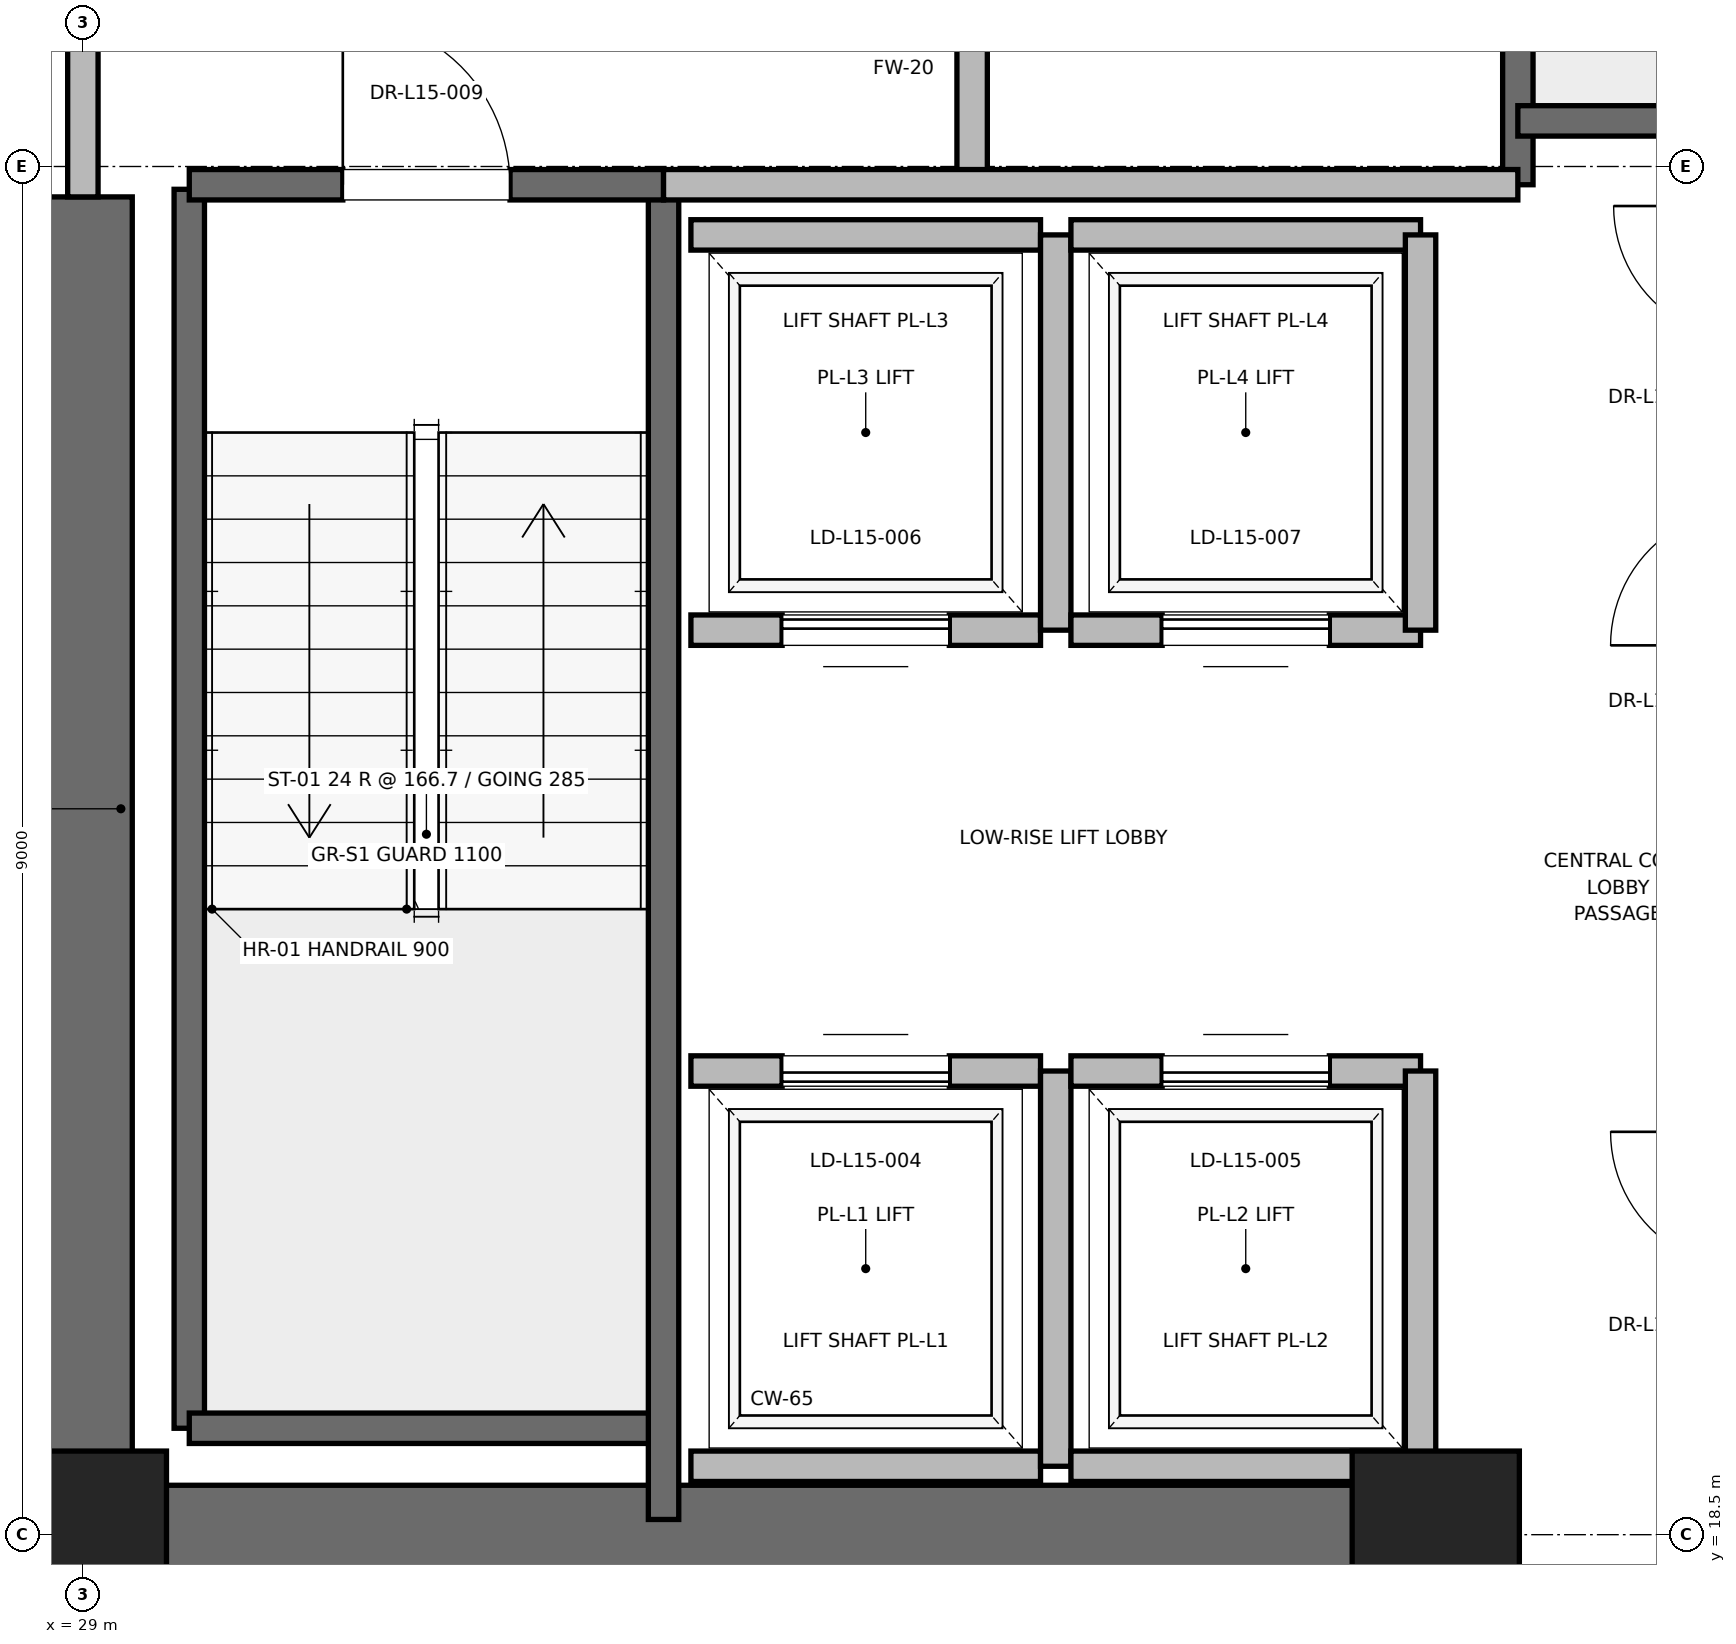
"""IFC4 building model, lengths in metres.
Left out: names, types, materials, properties, quantities, classifications, styles, units other than length and angle.
Written with IfcOpenShell. Run it as: python <this file> out.ifc"""

import sys

from ifc_helpers import new_model, si_unit, direction, frame, frame_2d, origin, origin_2d, place, context, subcontext, project, spatial, rectangle, extrude, element, fill, save


model = new_model("IFC4")
c1 = context("Model", 3, precision=1e-05, world=origin(), true_north=direction((0.0, 1.0)))
c2 = subcontext(c1, "Body", "Model", "MODEL_VIEW")
j1 = project(units=[si_unit("LENGTHUNIT", "METRE"), si_unit("PLANEANGLEUNIT", "RADIAN")], contexts=[c1])
p1 = place(None, origin())
s1 = spatial("IfcSite", under=j1, at=p1, CompositionType="ELEMENT")
p2 = place(p1, origin())
s2 = spatial("IfcBuilding", under=s1, at=p2, CompositionType="ELEMENT")
p3 = place(p2, frame((0.0, 0.0, 67.6)))
s3 = spatial("IfcBuildingStorey", under=s2, at=p3, CompositionType="ELEMENT", Elevation=67.6)
for number, where, z_axis, x_axis in (
    (1, (29.0, 18.5, 0.0), (0.0, 0.0, 1.0), (1.0, 0.0, 0.0)),
    (2, (37.9, 18.5, 0.0), (0.0, 0.0, 1.0), (1.0, 0.0, 0.0)),
):
    element("IfcColumn", number, at=place(p3, frame(where, z_axis=z_axis, x_axis=x_axis)), inside=s3, PredefinedType="PILASTER", context=c2, shape_type="SweptSolid", body=[
        extrude(rectangle(XDim=1.1, YDim=1.1, at=origin_2d()), origin(), (0.0, 0.0, 1.0), 4.0),
    ])
p4 = place(p3, frame((29.0, 18.5, 0.0), z_axis=(0.0, 0.0, 1.0), x_axis=(1.0, 0.0, 0.0)))
e3 = element("IfcWall", 3, at=p4, inside=s3, PredefinedType="SHEAR", context=c2, shape_type="SweptSolid", body=[
    extrude(rectangle(XDim=9.2, YDim=0.65, at=frame_2d((4.6, 0.0))), origin(), (0.0, 0.0, 1.0), 3.76),
])
p5 = place(p3, frame((29.0, 18.5, 0.0), z_axis=(0.0, 0.0, 1.0), x_axis=(0.0, 1.0, 0.0)))
e4 = element("IfcWall", 4, at=p5, inside=s3, PredefinedType="SHEAR", context=c2, shape_type="SweptSolid", body=[
    extrude(rectangle(XDim=8.8, YDim=0.65, at=frame_2d((4.4, 0.0))), origin(), (0.0, 0.0, 1.0), 3.76),
])
p6 = place(p3, frame((29.7, 19.2, 0.0), z_axis=(0.0, 0.0, 1.0), x_axis=(0.0, 1.0, 0.0)))
e5 = element("IfcWall", 5, at=p6, inside=s3, PredefinedType="SOLIDWALL", context=c2, shape_type="SweptSolid", body=[
    extrude(rectangle(XDim=8.15, YDim=0.2, at=frame_2d((4.075, 0.0))), origin(), (0.0, 0.0, 1.0), 3.76),
])
p7 = place(p3, frame((29.7, 19.2, 0.0), z_axis=(0.0, 0.0, 1.0), x_axis=(1.0, 0.0, 0.0)))
e6 = element("IfcWall", 6, at=p7, inside=s3, PredefinedType="SOLIDWALL", context=c2, shape_type="SweptSolid", body=[
    extrude(rectangle(XDim=3.12, YDim=0.2, at=frame_2d((1.56, 0.0))), origin(), (0.0, 0.0, 1.0), 3.76),
])
p8 = place(p3, frame((32.82, 18.6, 0.0), z_axis=(0.0, 0.0, 1.0), x_axis=(0.0, 1.0, 0.0)))
e7 = element("IfcWall", 7, at=p8, inside=s3, PredefinedType="SOLIDWALL", context=c2, shape_type="SweptSolid", body=[
    extrude(rectangle(XDim=8.78, YDim=0.2, at=frame_2d((4.39, 0.0))), origin(), (0.0, 0.0, 1.0), 3.76),
])
p9 = place(p3, frame((29.7, 27.38, 0.0), z_axis=(0.0, 0.0, 1.0), x_axis=(1.0, 0.0, 0.0)))
e8 = element("IfcWall", 8, at=p9, inside=s3, PredefinedType="SOLIDWALL", context=c2, shape_type="SweptSolid", body=[
    extrude(rectangle(XDim=3.12, YDim=0.2, at=frame_2d((1.56, 0.0))), origin(), (0.0, 0.0, 1.0), 3.76),
])
p10 = place(p9, frame((1.01, 0.0, 0.0)))
e9 = element("IfcOpeningElement", 9, at=p10, cuts=e8, PredefinedType="OPENING", context=c2, shape_type="SweptSolid", body=[
    extrude(rectangle(XDim=1.1, YDim=2.15, at=frame_2d((0.55, 1.075))), frame((0.0, 0.1, 0.0), z_axis=(0.0, -1.0, 0.0), x_axis=(1.0, 0.0, 0.0)), (0.0, 0.0, 1.0), 0.2),
])
p11 = place(p3, frame((38.44, 27.38, 0.0), z_axis=(0.0, 0.0, 1.0), x_axis=(0.0, 1.0, 0.0)))
e10 = element("IfcWall", 10, at=p11, inside=s3, PredefinedType="SOLIDWALL", context=c2, shape_type="SweptSolid", body=[
    extrude(rectangle(XDim=8.87, YDim=0.2, at=frame_2d((4.435, 0.0))), origin(), (0.0, 0.0, 1.0), 3.76),
])
p12 = place(p3, frame((38.44, 27.8, 0.0), z_axis=(0.0, 0.0, 1.0), x_axis=(1.0, 0.0, 0.0)))
e11 = element("IfcWall", 11, at=p12, inside=s3, PredefinedType="SOLIDWALL", context=c2, shape_type="SweptSolid", body=[
    extrude(rectangle(XDim=3.32, YDim=0.2, at=frame_2d((1.66, 0.0))), origin(), (0.0, 0.0, 1.0), 3.76),
])
p13 = place(p3, frame((34.85, 27.38, 0.0), z_axis=(0.0, 0.0, 1.0), x_axis=(0.0, 1.0, 0.0)))
e12 = element("IfcWall", 12, at=p13, inside=s3, PredefinedType="PARTITIONING", context=c2, shape_type="SweptSolid", body=[
    extrude(rectangle(XDim=3.37, YDim=0.2, at=frame_2d((1.685, 0.0))), origin(), (0.0, 0.0, 1.0), 3.76),
])
p14 = place(p13, frame((1.11, 0.0, 0.0)))
e13 = element("IfcOpeningElement", 13, at=p14, cuts=e12, PredefinedType="OPENING", context=c2, shape_type="SweptSolid", body=[
    extrude(rectangle(XDim=1.15, YDim=2.2, at=frame_2d((0.575, 1.1))), frame((0.0, 0.1, 0.0), z_axis=(0.0, -1.0, 0.0), x_axis=(1.0, 0.0, 0.0)), (0.0, 0.0, 1.0), 0.2),
])
p15 = place(p3, frame((29.0, 27.3, 0.0), z_axis=(0.0, 0.0, 1.0), x_axis=(0.0, 1.0, 0.0)))
e14 = element("IfcWall", 14, at=p15, inside=s3, PredefinedType="PARTITIONING", context=c2, shape_type="SweptSolid", body=[
    extrude(rectangle(XDim=3.4, YDim=0.2, at=frame_2d((1.7, 0.0))), origin(), (0.0, 0.0, 1.0), 2.54),
])
p16 = place(p15, frame((1.125, 0.0, 0.0)))
e15 = element("IfcOpeningElement", 15, at=p16, cuts=e14, PredefinedType="OPENING", context=c2, shape_type="SweptSolid", body=[
    extrude(rectangle(XDim=1.15, YDim=2.2, at=frame_2d((0.575, 1.1))), frame((0.0, 0.1, 0.0), z_axis=(0.0, -1.0, 0.0), x_axis=(1.0, 0.0, 0.0)), (0.0, 0.0, 1.0), 0.2),
])
p17 = place(p3, frame((32.82, 27.38, 0.0), z_axis=(0.0, 0.0, 1.0), x_axis=(1.0, 0.0, 0.0)))
e16 = element("IfcWall", 16, at=p17, inside=s3, PredefinedType="PARTITIONING", context=c2, shape_type="SweptSolid", body=[
    extrude(rectangle(XDim=5.62, YDim=0.2, at=frame_2d((2.81, 0.0))), origin(), (0.0, 0.0, 1.0), 3.76),
])
p18 = place(p3, frame((33.0, 18.95, 0.0), z_axis=(0.0, 0.0, 1.0), x_axis=(1.0, 0.0, 0.0)))
e17 = element("IfcWall", 17, at=p18, inside=s3, PredefinedType="SOLIDWALL", context=c2, shape_type="SweptSolid", body=[
    extrude(rectangle(XDim=2.3, YDim=0.2, at=frame_2d((1.15, 0.0))), origin(), (0.0, 0.0, 1.0), 3.76),
])
p19 = place(p3, frame((35.3, 21.55, 0.0), z_axis=(0.0, 0.0, 1.0), x_axis=(-1.0, 0.0, 0.0)))
e18 = element("IfcWall", 18, at=p19, inside=s3, PredefinedType="SOLIDWALL", context=c2, shape_type="SweptSolid", body=[
    extrude(rectangle(XDim=2.3, YDim=0.2, at=frame_2d((1.15, 0.0))), origin(), (0.0, 0.0, 1.0), 3.76),
])
p20 = place(p19, frame((0.6, 0.0, 0.0)))
e19 = element("IfcOpeningElement", 19, at=p20, cuts=e18, PredefinedType="OPENING", context=c2, shape_type="SweptSolid", body=[
    extrude(rectangle(XDim=1.1, YDim=2.2, at=frame_2d((0.55, 1.1))), frame((0.0, 0.1, 0.0), z_axis=(0.0, -1.0, 0.0), x_axis=(1.0, 0.0, 0.0)), (0.0, 0.0, 1.0), 0.2),
])
p21 = place(p3, frame((35.4, 18.95, 0.0), z_axis=(0.0, 0.0, 1.0), x_axis=(0.0, 1.0, 0.0)))
e20 = element("IfcWall", 20, at=p21, inside=s3, PredefinedType="SOLIDWALL", context=c2, shape_type="SweptSolid", body=[
    extrude(rectangle(XDim=2.6, YDim=0.2, at=frame_2d((1.3, 0.0))), origin(), (0.0, 0.0, 1.0), 3.76),
])
p22 = place(p3, frame((35.5, 18.95, 0.0), z_axis=(0.0, 0.0, 1.0), x_axis=(1.0, 0.0, 0.0)))
e21 = element("IfcWall", 21, at=p22, inside=s3, PredefinedType="SOLIDWALL", context=c2, shape_type="SweptSolid", body=[
    extrude(rectangle(XDim=2.3, YDim=0.2, at=frame_2d((1.15, 0.0))), origin(), (0.0, 0.0, 1.0), 2.54),
])
p23 = place(p3, frame((37.8, 21.55, 0.0), z_axis=(0.0, 0.0, 1.0), x_axis=(-1.0, 0.0, 0.0)))
e22 = element("IfcWall", 22, at=p23, inside=s3, PredefinedType="SOLIDWALL", context=c2, shape_type="SweptSolid", body=[
    extrude(rectangle(XDim=2.3, YDim=0.2, at=frame_2d((1.15, 0.0))), origin(), (0.0, 0.0, 1.0), 3.76),
])
p24 = place(p23, frame((0.6, 0.0, 0.0)))
e23 = element("IfcOpeningElement", 23, at=p24, cuts=e22, PredefinedType="OPENING", context=c2, shape_type="SweptSolid", body=[
    extrude(rectangle(XDim=1.1, YDim=2.2, at=frame_2d((0.55, 1.1))), frame((0.0, 0.1, 0.0), z_axis=(0.0, -1.0, 0.0), x_axis=(1.0, 0.0, 0.0)), (0.0, 0.0, 1.0), 0.2),
])
p25 = place(p3, frame((37.8, 18.95, 0.0), z_axis=(0.0, 0.0, 1.0), x_axis=(0.0, 1.0, 0.0)))
e24 = element("IfcWall", 24, at=p25, inside=s3, PredefinedType="SOLIDWALL", context=c2, shape_type="SweptSolid", body=[
    extrude(rectangle(XDim=2.6, YDim=0.2, at=frame_2d((1.3, 0.0))), origin(), (0.0, 0.0, 1.0), 2.54),
])
p26 = place(p3, frame((33.0, 24.45, 0.0), z_axis=(0.0, 0.0, 1.0), x_axis=(1.0, 0.0, 0.0)))
e25 = element("IfcWall", 25, at=p26, inside=s3, PredefinedType="SOLIDWALL", context=c2, shape_type="SweptSolid", body=[
    extrude(rectangle(XDim=2.3, YDim=0.2, at=frame_2d((1.15, 0.0))), origin(), (0.0, 0.0, 1.0), 3.76),
])
p27 = place(p26, frame((0.6, 0.0, 0.0)))
e26 = element("IfcOpeningElement", 26, at=p27, cuts=e25, PredefinedType="OPENING", context=c2, shape_type="SweptSolid", body=[
    extrude(rectangle(XDim=1.1, YDim=2.2, at=frame_2d((0.55, 1.1))), frame((0.0, 0.1, 0.0), z_axis=(0.0, -1.0, 0.0), x_axis=(1.0, 0.0, 0.0)), (0.0, 0.0, 1.0), 0.2),
])
p28 = place(p3, frame((35.3, 27.05, 0.0), z_axis=(0.0, 0.0, 1.0), x_axis=(-1.0, 0.0, 0.0)))
e27 = element("IfcWall", 27, at=p28, inside=s3, PredefinedType="SOLIDWALL", context=c2, shape_type="SweptSolid", body=[
    extrude(rectangle(XDim=2.3, YDim=0.2, at=frame_2d((1.15, 0.0))), origin(), (0.0, 0.0, 1.0), 3.76),
])
p29 = place(p3, frame((35.4, 24.45, 0.0), z_axis=(0.0, 0.0, 1.0), x_axis=(0.0, 1.0, 0.0)))
e28 = element("IfcWall", 28, at=p29, inside=s3, PredefinedType="SOLIDWALL", context=c2, shape_type="SweptSolid", body=[
    extrude(rectangle(XDim=2.6, YDim=0.2, at=frame_2d((1.3, 0.0))), origin(), (0.0, 0.0, 1.0), 3.76),
])
p30 = place(p3, frame((35.5, 24.45, 0.0), z_axis=(0.0, 0.0, 1.0), x_axis=(1.0, 0.0, 0.0)))
e29 = element("IfcWall", 29, at=p30, inside=s3, PredefinedType="SOLIDWALL", context=c2, shape_type="SweptSolid", body=[
    extrude(rectangle(XDim=2.3, YDim=0.2, at=frame_2d((1.15, 0.0))), origin(), (0.0, 0.0, 1.0), 3.76),
])
p31 = place(p30, frame((0.6, 0.0, 0.0)))
e30 = element("IfcOpeningElement", 30, at=p31, cuts=e29, PredefinedType="OPENING", context=c2, shape_type="SweptSolid", body=[
    extrude(rectangle(XDim=1.1, YDim=2.2, at=frame_2d((0.55, 1.1))), frame((0.0, 0.1, 0.0), z_axis=(0.0, -1.0, 0.0), x_axis=(1.0, 0.0, 0.0)), (0.0, 0.0, 1.0), 0.2),
])
p32 = place(p3, frame((37.8, 27.05, 0.0), z_axis=(0.0, 0.0, 1.0), x_axis=(-1.0, 0.0, 0.0)))
e31 = element("IfcWall", 31, at=p32, inside=s3, PredefinedType="SOLIDWALL", context=c2, shape_type="SweptSolid", body=[
    extrude(rectangle(XDim=2.3, YDim=0.2, at=frame_2d((1.15, 0.0))), origin(), (0.0, 0.0, 1.0), 3.76),
])
p33 = place(p3, frame((37.8, 24.45, 0.0), z_axis=(0.0, 0.0, 1.0), x_axis=(0.0, 1.0, 0.0)))
e32 = element("IfcWall", 32, at=p33, inside=s3, PredefinedType="SOLIDWALL", context=c2, shape_type="SweptSolid", body=[
    extrude(rectangle(XDim=2.6, YDim=0.2, at=frame_2d((1.3, 0.0))), origin(), (0.0, 0.0, 1.0), 3.76),
])
p34 = place(p10, origin())
e33 = element("IfcDoor", 33, at=p34, inside=s3, OperationType="SINGLE_SWING_LEFT", PredefinedType="DOOR", context=c2, shape_type="SweptSolid", body=[
    extrude(rectangle(XDim=1.1, YDim=2.15, at=frame_2d((0.55, 1.075))), frame((0.0, 0.025, 0.0), z_axis=(0.0, -1.0, 0.0), x_axis=(1.0, 0.0, 0.0)), (0.0, 0.0, 1.0), 0.05),
])
fill(e9, e33)
p35 = place(p20, origin())
e34 = element("IfcDoor", 34, at=p35, inside=s3, OperationType="SLIDING_TO_RIGHT", PredefinedType="DOOR", context=c2, shape_type="SweptSolid", body=[
    extrude(rectangle(XDim=1.1, YDim=2.2, at=frame_2d((0.55, 1.1))), frame((0.0, 0.025, 0.0), z_axis=(0.0, -1.0, 0.0), x_axis=(1.0, 0.0, 0.0)), (0.0, 0.0, 1.0), 0.05),
])
fill(e19, e34)
p36 = place(p24, origin())
e35 = element("IfcDoor", 35, at=p36, inside=s3, OperationType="SLIDING_TO_RIGHT", PredefinedType="DOOR", context=c2, shape_type="SweptSolid", body=[
    extrude(rectangle(XDim=1.1, YDim=2.2, at=frame_2d((0.55, 1.1))), frame((0.0, 0.025, 0.0), z_axis=(0.0, -1.0, 0.0), x_axis=(1.0, 0.0, 0.0)), (0.0, 0.0, 1.0), 0.05),
])
fill(e23, e35)
p37 = place(p27, origin())
e36 = element("IfcDoor", 36, at=p37, inside=s3, OperationType="SLIDING_TO_RIGHT", PredefinedType="DOOR", context=c2, shape_type="SweptSolid", body=[
    extrude(rectangle(XDim=1.1, YDim=2.2, at=frame_2d((0.55, 1.1))), frame((0.0, 0.025, 0.0), z_axis=(0.0, -1.0, 0.0), x_axis=(1.0, 0.0, 0.0)), (0.0, 0.0, 1.0), 0.05),
])
fill(e26, e36)
p38 = place(p31, origin())
e37 = element("IfcDoor", 37, at=p38, inside=s3, OperationType="SLIDING_TO_RIGHT", PredefinedType="DOOR", context=c2, shape_type="SweptSolid", body=[
    extrude(rectangle(XDim=1.1, YDim=2.2, at=frame_2d((0.55, 1.1))), frame((0.0, 0.025, 0.0), z_axis=(0.0, -1.0, 0.0), x_axis=(1.0, 0.0, 0.0)), (0.0, 0.0, 1.0), 0.05),
])
fill(e30, e37)
save(model, sys.argv[1])
